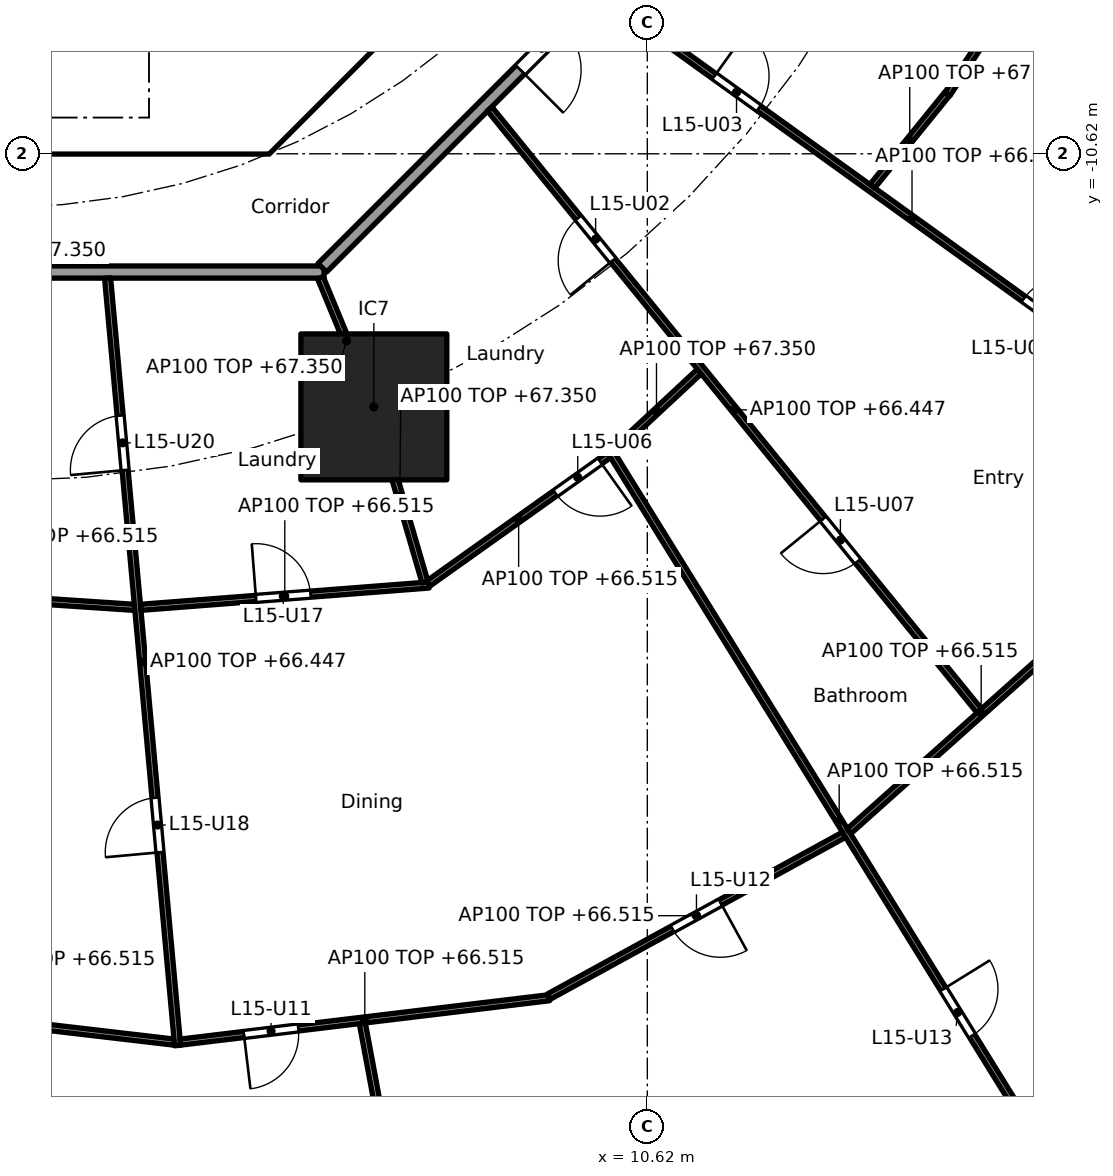
"""IFC4 building model, lengths in metres.
Left out: names, types, materials, properties, quantities, classifications, styles, units other than length and angle.
Written with IfcOpenShell. Run it as: python <this file> out.ifc"""

import sys

from ifc_helpers import new_model, si_unit, direction, frame, frame_2d, origin, origin_2d, place, context, subcontext, project, spatial, polyline, rectangle, outline, extrude, element, fill, save


model = new_model("IFC4")
c1 = context("Model", 3, precision=1e-05, world=origin(), true_north=direction((0.0, 1.0)))
c2 = subcontext(c1, "Body", "Model", "MODEL_VIEW")
j1 = project(units=[si_unit("LENGTHUNIT", "METRE"), si_unit("PLANEANGLEUNIT", "RADIAN")], contexts=[c1])
p1 = place(None, origin())
s1 = spatial("IfcSite", under=j1, at=p1, CompositionType="ELEMENT")
p2 = place(p1, origin())
s2 = spatial("IfcBuilding", under=s1, at=p2, CompositionType="ELEMENT")
p3 = place(p2, frame((0.0, 0.0, 64.0)))
s3 = spatial("IfcBuildingStorey", under=s2, at=p3, CompositionType="ELEMENT", Elevation=64.0)
p4 = place(p3, frame((6.123, -14.782, 0.0), z_axis=(0.0, 0.0, 1.0), x_axis=(1.0, 0.0, 0.0)))
e1 = element("IfcColumn", 1, at=p4, inside=s3, PredefinedType="COLUMN", context=c2, shape_type="SweptSolid", body=[
    extrude(rectangle(XDim=2.4, YDim=2.4, at=origin_2d()), origin(), (0.0, 0.0, 1.0), 3.7),
])
p5 = place(p3, frame((4.613, -9.988, 0.0), z_axis=(0.0, 0.0, 1.0), x_axis=(0.707106781187, 0.707106781187, 0.0)))
e2 = element("IfcWall", 2, at=p5, inside=s3, PredefinedType="SHEAR", context=c2, shape_type="SweptSolid", body=[
    extrude(rectangle(XDim=7.602, YDim=0.6, at=frame_2d((3.801, 0.0))), origin(), (0.0, 0.0, 1.0), 3.35),
])
p6 = place(p5, frame((3.201, 0.0, 0.0)))
e3 = element("IfcOpeningElement", 3, at=p6, cuts=e2, PredefinedType="OPENING", context=c2, shape_type="SweptSolid", body=[
    extrude(rectangle(XDim=1.2, YDim=2.1, at=frame_2d((0.6, 1.05))), frame((0.0, 0.31, 0.0), z_axis=(0.0, -1.0, 0.0), x_axis=(1.0, 0.0, 0.0)), (0.0, 0.0, 1.0), 0.62),
])
p7 = place(p3, frame((4.0, -10.025, 0.0), z_axis=(0.0, 0.0, 1.0), x_axis=(0.0, 1.0, 0.0)))
e4 = element("IfcWall", 4, at=p7, inside=s3, PredefinedType="SOLIDWALL", context=c2, shape_type="SweptSolid", body=[
    extrude(rectangle(XDim=3.0, YDim=0.2, at=frame_2d((1.5, 0.0))), origin(), (0.0, 0.0, 1.0), 3.35),
])
p8 = place(p7, frame((0.975, 0.0, 0.0)))
e5 = element("IfcOpeningElement", 5, at=p8, cuts=e4, PredefinedType="OPENING", context=c2, shape_type="SweptSolid", body=[
    extrude(rectangle(XDim=1.1, YDim=2.1, at=frame_2d((0.55, 1.05))), frame((0.0, 0.11, 0.0), z_axis=(0.0, -1.0, 0.0), x_axis=(1.0, 0.0, 0.0)), (0.0, 0.0, 1.0), 0.22),
])
p9 = place(p3, origin())
e6 = element("IfcWall", 6, at=p9, inside=s3, PredefinedType="SHEAR", context=c2, shape_type="SweptSolid", body=[
    extrude(outline(polyline([(-4.152, -10.025), (4.152, -10.025), (4.401, -9.776), (4.825, -10.2), (4.401, -10.625), (-4.401, -10.625), (-4.825, -10.2), (-4.401, -9.776), (-4.152, -10.025)])), origin(), (0.0, 0.0, 1.0), 3.35),
])
p10 = place(p3, frame((-5.104, -12.565, 0.0), z_axis=(0.0, 0.0, 1.0), x_axis=(1.0, 0.0, 0.0)))
e7 = element("IfcWall", 7, at=p10, inside=s3, PredefinedType="PARTITIONING", context=c2, shape_type="SweptSolid", body=[
    extrude(rectangle(XDim=10.409, YDim=0.2, at=frame_2d((5.205, 0.0))), origin(), (0.0, 0.0, 1.0), 3.35),
])
p11 = place(p3, frame((5.275, -12.494, 0.0), z_axis=(0.0, 0.0, 1.0), x_axis=(0.707106781187, 0.707106781187, 0.0)))
e8 = element("IfcWall", 8, at=p11, inside=s3, PredefinedType="PARTITIONING", context=c2, shape_type="SweptSolid", body=[
    extrude(rectangle(XDim=10.409, YDim=0.2, at=frame_2d((5.205, 0.0))), origin(), (0.0, 0.0, 1.0), 3.35),
])
p12 = place(p11, frame((4.604, 0.0, 0.0)))
e9 = element("IfcOpeningElement", 9, at=p12, cuts=e8, PredefinedType="OPENING", context=c2, shape_type="SweptSolid", body=[
    extrude(rectangle(XDim=1.0, YDim=2.1, at=frame_2d((0.5, 1.05))), frame((0.0, 0.11, 0.0), z_axis=(0.0, -1.0, 0.0), x_axis=(1.0, 0.0, 0.0)), (0.0, 0.0, 1.0), 0.22),
])
p13 = place(p3, frame((-2.271, -17.782, 0.0), z_axis=(0.0, 0.0, 1.0), x_axis=(0.997791437766, -0.066424744789, 0.0)))
e10 = element("IfcWall", 10, at=p13, inside=s3, PredefinedType="PARTITIONING", context=c2, shape_type="SweptSolid", body=[
    extrude(rectangle(XDim=4.469, YDim=0.1, at=frame_2d((2.235, 0.0))), origin(), (0.0, 0.0, 1.0), 2.515),
])
p14 = place(p3, frame((-3.031, -24.543, 0.0), z_axis=(0.0, 0.0, 1.0), x_axis=(0.993255612046, -0.115945198862, 0.0)))
e11 = element("IfcWall", 11, at=p14, inside=s3, PredefinedType="PARTITIONING", context=c2, shape_type="SweptSolid", body=[
    extrude(rectangle(XDim=5.913, YDim=0.1, at=frame_2d((2.956, 0.0))), origin(), (0.0, 0.0, 1.0), 2.515),
])
p15 = place(p3, frame((1.744, -12.664, 0.0), z_axis=(0.0, 0.0, 1.0), x_axis=(0.090893569001, -0.995860612292, 0.0)))
e12 = element("IfcWall", 12, at=p15, inside=s3, PredefinedType="PARTITIONING", context=c2, shape_type="SweptSolid", body=[
    extrude(rectangle(XDim=12.673, YDim=0.1, at=frame_2d((6.336, 0.0))), origin(), (0.0, 0.0, 1.0), 2.447),
])
p16 = place(p15, frame((8.582, 0.0, 0.0)))
e13 = element("IfcOpeningElement", 13, at=p16, cuts=e12, PredefinedType="OPENING", context=c2, shape_type="SweptSolid", body=[
    extrude(rectangle(XDim=0.9, YDim=2.1, at=frame_2d((0.45, 1.05))), frame((0.0, 0.06, 0.0), z_axis=(0.0, -1.0, 0.0), x_axis=(1.0, 0.0, 0.0)), (0.0, 0.0, 1.0), 0.12),
])
p17 = place(p15, frame((2.27, 0.0, 0.0)))
e14 = element("IfcOpeningElement", 14, at=p17, cuts=e12, PredefinedType="OPENING", context=c2, shape_type="SweptSolid", body=[
    extrude(rectangle(XDim=0.9, YDim=2.1, at=frame_2d((0.45, 1.05))), frame((0.0, 0.06, 0.0), z_axis=(0.0, -1.0, 0.0), x_axis=(1.0, 0.0, 0.0)), (0.0, 0.0, 1.0), 0.12),
])
p18 = place(p3, frame((2.288, -18.078, 0.0), z_axis=(0.0, 0.0, 1.0), x_axis=(0.997016297228, 0.077191340583, 0.0)))
e15 = element("IfcWall", 15, at=p18, inside=s3, PredefinedType="PARTITIONING", context=c2, shape_type="SweptSolid", body=[
    extrude(rectangle(XDim=4.754, YDim=0.1, at=frame_2d((2.377, 0.0))), origin(), (0.0, 0.0, 1.0), 2.515),
])
p19 = place(p18, frame((1.902, 0.0, 0.0)))
e16 = element("IfcOpeningElement", 16, at=p19, cuts=e15, PredefinedType="OPENING", context=c2, shape_type="SweptSolid", body=[
    extrude(rectangle(XDim=0.9, YDim=2.1, at=frame_2d((0.45, 1.05))), frame((0.0, 0.06, 0.0), z_axis=(0.0, -1.0, 0.0), x_axis=(1.0, 0.0, 0.0)), (0.0, 0.0, 1.0), 0.12),
])
p20 = place(p3, frame((2.941, -25.229, 0.0), z_axis=(0.0, 0.0, 1.0), x_axis=(0.992836126149, 0.119484001497, 0.0)))
e17 = element("IfcWall", 17, at=p20, inside=s3, PredefinedType="PARTITIONING", context=c2, shape_type="SweptSolid", body=[
    extrude(rectangle(XDim=6.109, YDim=0.1, at=frame_2d((3.055, 0.0))), origin(), (0.0, 0.0, 1.0), 2.515),
])
p21 = place(p20, frame((1.052, 0.0, 0.0)))
e18 = element("IfcOpeningElement", 18, at=p21, cuts=e17, PredefinedType="OPENING", context=c2, shape_type="SweptSolid", body=[
    extrude(rectangle(XDim=0.9, YDim=2.1, at=frame_2d((0.45, 1.05))), frame((0.0, 0.06, 0.0), z_axis=(0.0, -1.0, 0.0), x_axis=(1.0, 0.0, 0.0)), (0.0, 0.0, 1.0), 0.12),
])
p22 = place(p3, frame((5.933, -24.919, 0.0), z_axis=(0.0, 0.0, 1.0), x_axis=(0.183018461258, -0.983109476528, 0.0)))
e19 = element("IfcWall", 19, at=p22, inside=s3, PredefinedType="PARTITIONING", context=c2, shape_type="SweptSolid", body=[
    extrude(rectangle(XDim=7.893, YDim=0.1, at=frame_2d((3.947, 0.0))), origin(), (0.0, 0.0, 1.0), 2.738),
])
p23 = place(p3, frame((5.243, -12.657, 0.0), z_axis=(0.0, 0.0, 1.0), x_axis=(0.382719158442, -0.923864733477, 0.0)))
e20 = element("IfcWall", 20, at=p23, inside=s3, PredefinedType="PARTITIONING", context=c2, shape_type="SweptSolid", body=[
    extrude(rectangle(XDim=2.25, YDim=0.1, at=frame_2d((1.125, 0.0))), origin(), (0.0, 0.0, 1.0), 3.35),
])
p24 = place(p3, frame((6.137, -14.83, 0.0), z_axis=(0.0, 0.0, 1.0), x_axis=(0.279888967793, -0.960032377427, 0.0)))
e21 = element("IfcWall", 21, at=p24, inside=s3, PredefinedType="PARTITIONING", context=c2, shape_type="SweptSolid", body=[
    extrude(rectangle(XDim=2.955, YDim=0.1, at=frame_2d((1.478, 0.0))), origin(), (0.0, 0.0, 1.0), 3.35),
])
p25 = place(p3, frame((7.019, -17.686, 0.0), z_axis=(0.0, 0.0, 1.0), x_axis=(0.81494477814, 0.57953861699, 0.0)))
e22 = element("IfcWall", 22, at=p25, inside=s3, PredefinedType="PARTITIONING", context=c2, shape_type="SweptSolid", body=[
    extrude(rectangle(XDim=3.644, YDim=0.1, at=frame_2d((1.822, 0.0))), origin(), (0.0, 0.0, 1.0), 2.515),
])
p26 = place(p25, frame((2.564, 0.0, 0.0)))
e23 = element("IfcOpeningElement", 23, at=p26, cuts=e22, PredefinedType="OPENING", context=c2, shape_type="SweptSolid", body=[
    extrude(rectangle(XDim=0.9, YDim=2.1, at=frame_2d((0.45, 1.05))), frame((0.0, 0.06, 0.0), z_axis=(0.0, -1.0, 0.0), x_axis=(1.0, 0.0, 0.0)), (0.0, 0.0, 1.0), 0.12),
])
p27 = place(p3, frame((9.001, -24.48, 0.0), z_axis=(0.0, 0.0, 1.0), x_axis=(0.876794415294, 0.480865421203, 0.0)))
e24 = element("IfcWall", 24, at=p27, inside=s3, PredefinedType="PARTITIONING", context=c2, shape_type="SweptSolid", body=[
    extrude(rectangle(XDim=5.536, YDim=0.1, at=frame_2d((2.768, 0.0))), origin(), (0.0, 0.0, 1.0), 2.515),
])
p28 = place(p27, frame((2.318, 0.0, 0.0)))
e25 = element("IfcOpeningElement", 25, at=p28, cuts=e24, PredefinedType="OPENING", context=c2, shape_type="SweptSolid", body=[
    extrude(rectangle(XDim=0.9, YDim=2.1, at=frame_2d((0.45, 1.05))), frame((0.0, 0.06, 0.0), z_axis=(0.0, -1.0, 0.0), x_axis=(1.0, 0.0, 0.0)), (0.0, 0.0, 1.0), 0.12),
])
p29 = place(p3, frame((10.003, -15.503, 0.0), z_axis=(0.0, 0.0, 1.0), x_axis=(0.526446106164, -0.850208502254, 0.0)))
e26 = element("IfcWall", 26, at=p29, inside=s3, PredefinedType="PARTITIONING", context=c2, shape_type="SweptSolid", body=[
    extrude(rectangle(XDim=14.33, YDim=0.1, at=frame_2d((7.165, 0.0))), origin(), (0.0, 0.0, 1.0), 2.515),
])
p30 = place(p29, frame((10.415, 0.0, 0.0)))
e27 = element("IfcOpeningElement", 27, at=p30, cuts=e26, PredefinedType="OPENING", context=c2, shape_type="SweptSolid", body=[
    extrude(rectangle(XDim=0.9, YDim=2.1, at=frame_2d((0.45, 1.05))), frame((0.0, 0.06, 0.0), z_axis=(0.0, -1.0, 0.0), x_axis=(1.0, 0.0, 0.0)), (0.0, 0.0, 1.0), 0.12),
])
p31 = place(p3, frame((10.066, -15.511, 0.0), z_axis=(0.0, 0.0, 1.0), x_axis=(0.73201609945, 0.681287333029, 0.0)))
e28 = element("IfcWall", 28, at=p31, inside=s3, PredefinedType="PARTITIONING", context=c2, shape_type="SweptSolid", body=[
    extrude(rectangle(XDim=1.925, YDim=0.1, at=frame_2d((0.962, 0.0))), origin(), (0.0, 0.0, 1.0), 3.35),
])
p32 = place(p3, frame((13.936, -21.761, 0.0), z_axis=(0.0, 0.0, 1.0), x_axis=(0.745806142791, 0.666163041136, 0.0)))
e29 = element("IfcWall", 29, at=p32, inside=s3, PredefinedType="PARTITIONING", context=c2, shape_type="SweptSolid", body=[
    extrude(rectangle(XDim=5.831, YDim=0.1, at=frame_2d((2.915, 0.0))), origin(), (0.0, 0.0, 1.0), 2.515),
])
p33 = place(p3, frame((8.028, -9.882, 0.0), z_axis=(0.0, 0.0, 1.0), x_axis=(0.631035554955, -0.77575390968, 0.0)))
e30 = element("IfcWall", 30, at=p33, inside=s3, PredefinedType="PARTITIONING", context=c2, shape_type="SweptSolid", body=[
    extrude(rectangle(XDim=12.759, YDim=0.1, at=frame_2d((6.379, 0.0))), origin(), (0.0, 0.0, 1.0), 2.447),
])
p34 = place(p33, frame((2.311, 0.0, 0.0)))
e31 = element("IfcOpeningElement", 31, at=p34, cuts=e30, PredefinedType="OPENING", context=c2, shape_type="SweptSolid", body=[
    extrude(rectangle(XDim=0.9, YDim=2.1, at=frame_2d((0.45, 1.05))), frame((0.0, 0.06, 0.0), z_axis=(0.0, -1.0, 0.0), x_axis=(1.0, 0.0, 0.0)), (0.0, 0.0, 1.0), 0.12),
])
p35 = place(p33, frame((8.69, 0.0, 0.0)))
e32 = element("IfcOpeningElement", 32, at=p35, cuts=e30, PredefinedType="OPENING", context=c2, shape_type="SweptSolid", body=[
    extrude(rectangle(XDim=0.9, YDim=2.1, at=frame_2d((0.45, 1.05))), frame((0.0, 0.06, 0.0), z_axis=(0.0, -1.0, 0.0), x_axis=(1.0, 0.0, 0.0)), (0.0, 0.0, 1.0), 0.12),
])
p36 = place(p3, frame((9.886, -8.023, 0.0), z_axis=(0.0, 0.0, 1.0), x_axis=(0.811615973871, -0.58419133078, 0.0)))
e33 = element("IfcWall", 33, at=p36, inside=s3, PredefinedType="PARTITIONING", context=c2, shape_type="SweptSolid", body=[
    extrude(rectangle(XDim=12.535, YDim=0.1, at=frame_2d((6.268, 0.0))), origin(), (0.0, 0.0, 1.0), 2.447),
])
p37 = place(p36, frame((2.262, 0.0, 0.0)))
e34 = element("IfcOpeningElement", 34, at=p37, cuts=e33, PredefinedType="OPENING", context=c2, shape_type="SweptSolid", body=[
    extrude(rectangle(XDim=0.9, YDim=2.1, at=frame_2d((0.45, 1.05))), frame((0.0, 0.06, 0.0), z_axis=(0.0, -1.0, 0.0), x_axis=(1.0, 0.0, 0.0)), (0.0, 0.0, 1.0), 0.12),
])
p38 = place(p36, frame((8.53, 0.0, 0.0)))
e35 = element("IfcOpeningElement", 35, at=p38, cuts=e33, PredefinedType="OPENING", context=c2, shape_type="SweptSolid", body=[
    extrude(rectangle(XDim=0.9, YDim=2.1, at=frame_2d((0.45, 1.05))), frame((0.0, 0.06, 0.0), z_axis=(0.0, -1.0, 0.0), x_axis=(1.0, 0.0, 0.0)), (0.0, 0.0, 1.0), 0.12),
])
p39 = place(p3, frame((14.32, -11.153, 0.0), z_axis=(0.0, 0.0, 1.0), x_axis=(0.63006076661, 0.776545832761, 0.0)))
e36 = element("IfcWall", 36, at=p39, inside=s3, PredefinedType="PARTITIONING", context=c2, shape_type="SweptSolid", body=[
    extrude(rectangle(XDim=1.953, YDim=0.1, at=frame_2d((0.977, 0.0))), origin(), (0.0, 0.0, 1.0), 3.35),
])
p40 = place(p3, frame((15.555, -9.639, 0.0), z_axis=(0.0, 0.0, 1.0), x_axis=(0.547618530423, 0.836728119007, 0.0)))
e37 = element("IfcWall", 37, at=p40, inside=s3, PredefinedType="PARTITIONING", context=c2, shape_type="SweptSolid", body=[
    extrude(rectangle(XDim=3.67, YDim=0.1, at=frame_2d((1.835, 0.0))), origin(), (0.0, 0.0, 1.0), 2.515),
])
p41 = place(p8, origin())
e38 = element("IfcDoor", 38, at=p41, inside=s3, OperationType="SINGLE_SWING_LEFT", PredefinedType="DOOR", context=c2, shape_type="SweptSolid", body=[
    extrude(rectangle(XDim=1.1, YDim=2.1, at=frame_2d((0.55, 1.05))), frame((0.0, 0.025, 0.0), z_axis=(0.0, -1.0, 0.0), x_axis=(1.0, 0.0, 0.0)), (0.0, 0.0, 1.0), 0.05),
])
fill(e5, e38)
p42 = place(p12, frame((1.0, 0.0, 0.0), x_axis=(-1.0, 0.0, 0.0)))
e39 = element("IfcDoor", 39, at=p42, inside=s3, OperationType="SINGLE_SWING_RIGHT", PredefinedType="DOOR", context=c2, shape_type="SweptSolid", body=[
    extrude(rectangle(XDim=1.0, YDim=2.1, at=frame_2d((0.5, 1.05))), frame((0.0, 0.025, 0.0), z_axis=(0.0, -1.0, 0.0), x_axis=(1.0, 0.0, 0.0)), (0.0, 0.0, 1.0), 0.05),
])
fill(e9, e39)
p43 = place(p34, frame((0.9, 0.0, 0.0), x_axis=(-1.0, 0.0, 0.0)))
e40 = element("IfcDoor", 40, at=p43, inside=s3, OperationType="SINGLE_SWING_LEFT", PredefinedType="DOOR", context=c2, shape_type="SweptSolid", body=[
    extrude(rectangle(XDim=0.9, YDim=2.1, at=frame_2d((0.45, 1.05))), frame((0.0, 0.025, 0.0), z_axis=(0.0, -1.0, 0.0), x_axis=(1.0, 0.0, 0.0)), (0.0, 0.0, 1.0), 0.05),
])
fill(e31, e40)
p44 = place(p37, origin())
e41 = element("IfcDoor", 41, at=p44, inside=s3, OperationType="SINGLE_SWING_LEFT", PredefinedType="DOOR", context=c2, shape_type="SweptSolid", body=[
    extrude(rectangle(XDim=0.9, YDim=2.1, at=frame_2d((0.45, 1.05))), frame((0.0, 0.025, 0.0), z_axis=(0.0, -1.0, 0.0), x_axis=(1.0, 0.0, 0.0)), (0.0, 0.0, 1.0), 0.05),
])
fill(e34, e41)
p45 = place(p26, frame((0.9, 0.0, 0.0), x_axis=(-1.0, 0.0, 0.0)))
e42 = element("IfcDoor", 42, at=p45, inside=s3, OperationType="SINGLE_SWING_LEFT", PredefinedType="DOOR", context=c2, shape_type="SweptSolid", body=[
    extrude(rectangle(XDim=0.9, YDim=2.1, at=frame_2d((0.45, 1.05))), frame((0.0, 0.025, 0.0), z_axis=(0.0, -1.0, 0.0), x_axis=(1.0, 0.0, 0.0)), (0.0, 0.0, 1.0), 0.05),
])
fill(e23, e42)
p46 = place(p35, frame((0.9, 0.0, 0.0), x_axis=(-1.0, 0.0, 0.0)))
e43 = element("IfcDoor", 43, at=p46, inside=s3, OperationType="SINGLE_SWING_RIGHT", PredefinedType="DOOR", context=c2, shape_type="SweptSolid", body=[
    extrude(rectangle(XDim=0.9, YDim=2.1, at=frame_2d((0.45, 1.05))), frame((0.0, 0.025, 0.0), z_axis=(0.0, -1.0, 0.0), x_axis=(1.0, 0.0, 0.0)), (0.0, 0.0, 1.0), 0.05),
])
fill(e32, e43)
p47 = place(p38, origin())
e44 = element("IfcDoor", 44, at=p47, inside=s3, OperationType="SINGLE_SWING_RIGHT", PredefinedType="DOOR", context=c2, shape_type="SweptSolid", body=[
    extrude(rectangle(XDim=0.9, YDim=2.1, at=frame_2d((0.45, 1.05))), frame((0.0, 0.025, 0.0), z_axis=(0.0, -1.0, 0.0), x_axis=(1.0, 0.0, 0.0)), (0.0, 0.0, 1.0), 0.05),
])
fill(e35, e44)
p48 = place(p21, frame((0.9, 0.0, 0.0), x_axis=(-1.0, 0.0, 0.0)))
e45 = element("IfcDoor", 45, at=p48, inside=s3, OperationType="SINGLE_SWING_RIGHT", PredefinedType="DOOR", context=c2, shape_type="SweptSolid", body=[
    extrude(rectangle(XDim=0.9, YDim=2.1, at=frame_2d((0.45, 1.05))), frame((0.0, 0.025, 0.0), z_axis=(0.0, -1.0, 0.0), x_axis=(1.0, 0.0, 0.0)), (0.0, 0.0, 1.0), 0.05),
])
fill(e18, e45)
p49 = place(p28, frame((0.9, 0.0, 0.0), x_axis=(-1.0, 0.0, 0.0)))
e46 = element("IfcDoor", 46, at=p49, inside=s3, OperationType="SINGLE_SWING_LEFT", PredefinedType="DOOR", context=c2, shape_type="SweptSolid", body=[
    extrude(rectangle(XDim=0.9, YDim=2.1, at=frame_2d((0.45, 1.05))), frame((0.0, 0.025, 0.0), z_axis=(0.0, -1.0, 0.0), x_axis=(1.0, 0.0, 0.0)), (0.0, 0.0, 1.0), 0.05),
])
fill(e25, e46)
p50 = place(p30, origin())
e47 = element("IfcDoor", 47, at=p50, inside=s3, OperationType="SINGLE_SWING_LEFT", PredefinedType="DOOR", context=c2, shape_type="SweptSolid", body=[
    extrude(rectangle(XDim=0.9, YDim=2.1, at=frame_2d((0.45, 1.05))), frame((0.0, 0.025, 0.0), z_axis=(0.0, -1.0, 0.0), x_axis=(1.0, 0.0, 0.0)), (0.0, 0.0, 1.0), 0.05),
])
fill(e27, e47)
p51 = place(p19, origin())
e48 = element("IfcDoor", 48, at=p51, inside=s3, OperationType="SINGLE_SWING_LEFT", PredefinedType="DOOR", context=c2, shape_type="SweptSolid", body=[
    extrude(rectangle(XDim=0.9, YDim=2.1, at=frame_2d((0.45, 1.05))), frame((0.0, 0.025, 0.0), z_axis=(0.0, -1.0, 0.0), x_axis=(1.0, 0.0, 0.0)), (0.0, 0.0, 1.0), 0.05),
])
fill(e16, e48)
p52 = place(p16, frame((0.9, 0.0, 0.0), x_axis=(-1.0, 0.0, 0.0)))
e49 = element("IfcDoor", 49, at=p52, inside=s3, OperationType="SINGLE_SWING_LEFT", PredefinedType="DOOR", context=c2, shape_type="SweptSolid", body=[
    extrude(rectangle(XDim=0.9, YDim=2.1, at=frame_2d((0.45, 1.05))), frame((0.0, 0.025, 0.0), z_axis=(0.0, -1.0, 0.0), x_axis=(1.0, 0.0, 0.0)), (0.0, 0.0, 1.0), 0.05),
])
fill(e13, e49)
p53 = place(p17, frame((0.9, 0.0, 0.0), x_axis=(-1.0, 0.0, 0.0)))
e50 = element("IfcDoor", 50, at=p53, inside=s3, OperationType="SINGLE_SWING_LEFT", PredefinedType="DOOR", context=c2, shape_type="SweptSolid", body=[
    extrude(rectangle(XDim=0.9, YDim=2.1, at=frame_2d((0.45, 1.05))), frame((0.0, 0.025, 0.0), z_axis=(0.0, -1.0, 0.0), x_axis=(1.0, 0.0, 0.0)), (0.0, 0.0, 1.0), 0.05),
])
fill(e14, e50)
save(model, sys.argv[1])
